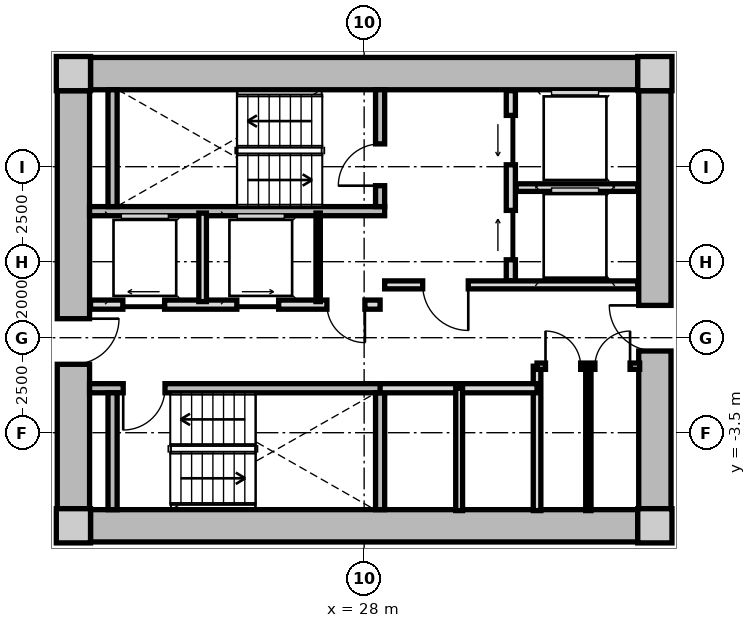
"""IFC4 building model, lengths in metres.
Left out: names, types, materials, properties, quantities, classifications, styles, units other than length and angle.
Written with IfcOpenShell. Run it as: python <this file> out.ifc"""

import sys

from ifc_helpers import new_model, si_unit, direction, frame, frame_2d, origin, origin_2d, place, context, subcontext, project, spatial, rectangle, extrude, source, transform, mapped, element, fill, save


model = new_model("IFC4")
c1 = context("Model", 3, precision=1e-05, world=origin(), true_north=direction((0.0, 1.0)))
c2 = subcontext(c1, "Body", "Model", "MODEL_VIEW")
j1 = project(units=[si_unit("LENGTHUNIT", "METRE"), si_unit("PLANEANGLEUNIT", "RADIAN")], contexts=[c1])
p1 = place(None, origin())
s1 = spatial("IfcSite", under=j1, at=p1, CompositionType="ELEMENT")
p2 = place(p1, origin())
s2 = spatial("IfcBuilding", under=s1, at=p2, CompositionType="ELEMENT")
p3 = place(p2, frame((0.0, 0.0, 30.75)))
s3 = spatial("IfcBuildingStorey", under=s2, at=p3, CompositionType="ELEMENT", Elevation=30.75)
m1 = source(origin(), c2, "Body", "SweptSolid", [
    extrude(rectangle(XDim=0.9, YDim=0.9, at=origin_2d()), origin(), (0.0, 0.0, 1.0), 3.05),
])
for number, where, z_axis, x_axis in (
    (1, (20.35, -5.95, 0.0), (0.0, 0.0, 1.0), (1.0, 0.0, 0.0)),
    (2, (35.65, -5.95, 0.0), (0.0, 0.0, 1.0), (1.0, 0.0, 0.0)),
    (3, (35.65, 5.95, 0.0), (0.0, 0.0, 1.0), (1.0, 0.0, 0.0)),
    (4, (20.35, 5.95, 0.0), (0.0, 0.0, 1.0), (1.0, 0.0, 0.0)),
):
    element("IfcColumn", number, at=place(p3, frame(where, z_axis=z_axis, x_axis=x_axis)), inside=s3, PredefinedType="COLUMN", context=c2, shape_type="MappedRepresentation", body=[
        mapped(m1, transform((0.0, 0.0, 0.0), x_axis=(1.0, 0.0, 0.0), y_axis=(0.0, 1.0, 0.0), z_axis=(0.0, 0.0, 1.0), scale=1.0)),
    ])
m2 = source(origin(), c2, "Body", "SweptSolid", [
    extrude(rectangle(XDim=14.4, YDim=0.85, at=frame_2d((7.2, 0.0))), origin(), (0.0, 0.0, 1.0), 2.79),
])
for number, where, z_axis, x_axis in (
    (5, (20.8, 5.95, 0.0), (0.0, 0.0, 1.0), (1.0, 0.0, 0.0)),
    (6, (35.2, -5.95, 0.0), (0.0, 0.0, 1.0), (-1.0, 0.0, 0.0)),
):
    element("IfcWall", number, at=place(p3, frame(where, z_axis=z_axis, x_axis=x_axis)), inside=s3, PredefinedType="SHEAR", context=c2, shape_type="MappedRepresentation", body=[
        mapped(m2, transform((0.0, 0.0, 0.0), x_axis=(1.0, 0.0, 0.0), y_axis=(0.0, 1.0, 0.0), z_axis=(0.0, 0.0, 1.0), scale=1.0)),
    ])
m3 = source(origin(), c2, "Body", "SweptSolid", [
    extrude(rectangle(XDim=11.0, YDim=0.85, at=frame_2d((5.5, 0.0))), origin(), (0.0, 0.0, 1.0), 2.79),
])
p4 = place(p3, frame((20.35, -5.5, 0.0), z_axis=(0.0, 0.0, 1.0), x_axis=(0.0, 1.0, 0.0)))
e7 = element("IfcWall", 7, at=p4, inside=s3, PredefinedType="SHEAR", context=c2, shape_type="MappedRepresentation", body=[
    mapped(m3, transform((0.0, 0.0, 0.0), x_axis=(1.0, 0.0, 0.0), y_axis=(0.0, 1.0, 0.0), z_axis=(0.0, 0.0, 1.0), scale=1.0)),
])
p5 = place(p4, frame((3.8, 0.0, 0.0)))
e8 = element("IfcOpeningElement", 8, at=p5, cuts=e7, PredefinedType="OPENING", context=c2, shape_type="SweptSolid", body=[
    extrude(rectangle(XDim=1.2, YDim=2.15, at=frame_2d((0.6, 1.075))), frame((0.0, 0.435, 0.0), z_axis=(0.0, -1.0, 0.0), x_axis=(1.0, 0.0, 0.0)), (0.0, 0.0, 1.0), 0.87),
])
p6 = place(p3, frame((35.65, 5.5, 0.0), z_axis=(0.0, 0.0, 1.0), x_axis=(0.0, -1.0, 0.0)))
e9 = element("IfcWall", 9, at=p6, inside=s3, PredefinedType="SHEAR", context=c2, shape_type="MappedRepresentation", body=[
    mapped(m3, transform((0.0, 0.0, 0.0), x_axis=(1.0, 0.0, 0.0), y_axis=(0.0, 1.0, 0.0), z_axis=(0.0, 0.0, 1.0), scale=1.0)),
])
p7 = place(p6, frame((5.65, 0.0, 0.0)))
e10 = element("IfcOpeningElement", 10, at=p7, cuts=e9, PredefinedType="OPENING", context=c2, shape_type="SweptSolid", body=[
    extrude(rectangle(XDim=1.2, YDim=2.15, at=frame_2d((0.6, 1.075))), frame((0.0, 0.435, 0.0), z_axis=(0.0, -1.0, 0.0), x_axis=(1.0, 0.0, 0.0)), (0.0, 0.0, 1.0), 0.87),
])
m4 = source(origin(), c2, "Body", "SweptSolid", [
    extrude(rectangle(XDim=7.765, YDim=0.24, at=frame_2d((3.883, 0.0))), origin(), (0.0, 0.0, 1.0), 2.79),
])
p8 = place(p3, frame((20.775, 2.33, 0.0), z_axis=(0.0, 0.0, 1.0), x_axis=(1.0, 0.0, 0.0)))
e11 = element("IfcWall", 11, at=p8, inside=s3, PredefinedType="PARTITIONING", context=c2, shape_type="MappedRepresentation", body=[
    mapped(m4, transform((0.0, 0.0, 0.0), x_axis=(1.0, 0.0, 0.0), y_axis=(0.0, 1.0, 0.0), z_axis=(0.0, 0.0, 1.0), scale=1.0)),
])
m5 = source(origin(), c2, "Body", "SweptSolid", [
    extrude(rectangle(XDim=3.075, YDim=0.24, at=frame_2d((1.538, 0.0))), origin(), (0.0, 0.0, 1.0), 2.79),
])
p9 = place(p3, frame((21.38, 2.45, 0.0), z_axis=(0.0, 0.0, 1.0), x_axis=(0.0, 1.0, 0.0)))
e12 = element("IfcWall", 12, at=p9, inside=s3, PredefinedType="PARTITIONING", context=c2, shape_type="MappedRepresentation", body=[
    mapped(m5, transform((0.0, 0.0, 0.0), x_axis=(1.0, 0.0, 0.0), y_axis=(0.0, 1.0, 0.0), z_axis=(0.0, 0.0, 1.0), scale=1.0)),
])
p10 = place(p3, frame((28.42, 2.45, 0.0), z_axis=(0.0, 0.0, 1.0), x_axis=(0.0, 1.0, 0.0)))
e13 = element("IfcWall", 13, at=p10, inside=s3, PredefinedType="PARTITIONING", context=c2, shape_type="MappedRepresentation", body=[
    mapped(m5, transform((0.0, 0.0, 0.0), x_axis=(1.0, 0.0, 0.0), y_axis=(0.0, 1.0, 0.0), z_axis=(0.0, 0.0, 1.0), scale=1.0)),
])
p11 = place(p10, frame((0.55, 0.0, 0.0)))
e14 = element("IfcOpeningElement", 14, at=p11, cuts=e13, PredefinedType="OPENING", context=c2, shape_type="SweptSolid", body=[
    extrude(rectangle(XDim=1.1, YDim=2.15, at=frame_2d((0.55, 1.075))), frame((0.0, 0.13, 0.0), z_axis=(0.0, -1.0, 0.0), x_axis=(1.0, 0.0, 0.0)), (0.0, 0.0, 1.0), 0.26),
])
p12 = place(p3, frame((20.775, -2.33, 0.0), z_axis=(0.0, 0.0, 1.0), x_axis=(1.0, 0.0, 0.0)))
e15 = element("IfcWall", 15, at=p12, inside=s3, PredefinedType="PARTITIONING", context=c2, shape_type="MappedRepresentation", body=[
    mapped(m4, transform((0.0, 0.0, 0.0), x_axis=(1.0, 0.0, 0.0), y_axis=(0.0, 1.0, 0.0), z_axis=(0.0, 0.0, 1.0), scale=1.0)),
])
p13 = place(p12, frame((0.885, 0.0, 0.0)))
e16 = element("IfcOpeningElement", 16, at=p13, cuts=e15, PredefinedType="OPENING", context=c2, shape_type="SweptSolid", body=[
    extrude(rectangle(XDim=1.1, YDim=2.15, at=frame_2d((0.55, 1.075))), frame((0.0, 0.13, 0.0), z_axis=(0.0, -1.0, 0.0), x_axis=(1.0, 0.0, 0.0)), (0.0, 0.0, 1.0), 0.26),
])
for number, where, z_axis, x_axis in (
    (17, (21.38, -5.525, 0.0), (0.0, 0.0, 1.0), (0.0, 1.0, 0.0)),
    (18, (28.42, -5.525, 0.0), (0.0, 0.0, 1.0), (0.0, 1.0, 0.0)),
):
    element("IfcWall", number, at=place(p3, frame(where, z_axis=z_axis, x_axis=x_axis)), inside=s3, PredefinedType="PARTITIONING", context=c2, shape_type="MappedRepresentation", body=[
        mapped(m5, transform((0.0, 0.0, 0.0), x_axis=(1.0, 0.0, 0.0), y_axis=(0.0, 1.0, 0.0), z_axis=(0.0, 0.0, 1.0), scale=1.0)),
    ])
m6 = source(origin(), c2, "Body", "SweptSolid", [
    extrude(rectangle(XDim=5.0, YDim=0.24, at=frame_2d((2.5, 0.0))), origin(), (0.0, 0.0, 1.0), 2.775),
])
p14 = place(p3, frame((31.86, 0.5, 0.0), z_axis=(0.0, 0.0, 1.0), x_axis=(0.0, 1.0, 0.0)))
e19 = element("IfcWall", 19, at=p14, inside=s3, PredefinedType="PARTITIONING", context=c2, shape_type="MappedRepresentation", body=[
    mapped(m6, transform((0.0, 0.0, 0.0), x_axis=(1.0, 0.0, 0.0), y_axis=(0.0, 1.0, 0.0), z_axis=(0.0, 0.0, 1.0), scale=1.0)),
])
p15 = place(p14, frame((3.05, 0.0, 0.0)))
e20 = element("IfcOpeningElement", 20, at=p15, cuts=e19, PredefinedType="OPENING", context=c2, shape_type="SweptSolid", body=[
    extrude(rectangle(XDim=1.3, YDim=2.2, at=frame_2d((0.65, 1.1))), frame((0.0, 0.13, 0.0), z_axis=(0.0, -1.0, 0.0), x_axis=(1.0, 0.0, 0.0)), (0.0, 0.0, 1.0), 0.26),
])
p16 = place(p14, frame((0.55, 0.0, 0.0)))
e21 = element("IfcOpeningElement", 21, at=p16, cuts=e19, PredefinedType="OPENING", context=c2, shape_type="SweptSolid", body=[
    extrude(rectangle(XDim=1.3, YDim=2.2, at=frame_2d((0.65, 1.1))), frame((0.0, 0.13, 0.0), z_axis=(0.0, -1.0, 0.0), x_axis=(1.0, 0.0, 0.0)), (0.0, 0.0, 1.0), 0.26),
])
m7 = source(origin(), c2, "Body", "SweptSolid", [
    extrude(rectangle(XDim=3.2, YDim=0.2, at=frame_2d((1.6, 0.0))), origin(), (0.0, 0.0, 1.0), 2.775),
])
p17 = place(p3, frame((32.0, 2.95, 0.0), z_axis=(0.0, 0.0, 1.0), x_axis=(1.0, 0.0, 0.0)))
e22 = element("IfcWall", 22, at=p17, inside=s3, PredefinedType="PARTITIONING", context=c2, shape_type="MappedRepresentation", body=[
    mapped(m7, transform((0.0, 0.0, 0.0), x_axis=(1.0, 0.0, 0.0), y_axis=(0.0, 1.0, 0.0), z_axis=(0.0, 0.0, 1.0), scale=1.0)),
])
m8 = source(origin(), c2, "Body", "SweptSolid", [
    extrude(rectangle(XDim=6.66, YDim=0.21, at=frame_2d((3.33, 0.0))), origin(), (0.0, 0.0, 1.0), 2.775),
])
p18 = place(p3, frame((28.54, 0.39, 0.0), z_axis=(0.0, 0.0, 1.0), x_axis=(1.0, 0.0, 0.0)))
e23 = element("IfcWall", 23, at=p18, inside=s3, PredefinedType="PARTITIONING", context=c2, shape_type="MappedRepresentation", body=[
    mapped(m8, transform((0.0, 0.0, 0.0), x_axis=(1.0, 0.0, 0.0), y_axis=(0.0, 1.0, 0.0), z_axis=(0.0, 0.0, 1.0), scale=1.0)),
])
p19 = place(p18, frame((1.0, 0.0, 0.0)))
e24 = element("IfcOpeningElement", 24, at=p19, cuts=e23, PredefinedType="OPENING", context=c2, shape_type="SweptSolid", body=[
    extrude(rectangle(XDim=1.2, YDim=2.15, at=frame_2d((0.6, 1.075))), frame((0.0, 0.115, 0.0), z_axis=(0.0, -1.0, 0.0), x_axis=(1.0, 0.0, 0.0)), (0.0, 0.0, 1.0), 0.23),
])
m9 = source(origin(), c2, "Body", "SweptSolid", [
    extrude(rectangle(XDim=7.62, YDim=0.24, at=frame_2d((3.81, 0.0))), origin(), (0.0, 0.0, 1.0), 2.775),
])
p20 = place(p3, frame((20.8, -0.13, 0.0), z_axis=(0.0, 0.0, 1.0), x_axis=(1.0, 0.0, 0.0)))
e25 = element("IfcWall", 25, at=p20, inside=s3, PredefinedType="PARTITIONING", context=c2, shape_type="MappedRepresentation", body=[
    mapped(m9, transform((0.0, 0.0, 0.0), x_axis=(1.0, 0.0, 0.0), y_axis=(0.0, 1.0, 0.0), z_axis=(0.0, 0.0, 1.0), scale=1.0)),
])
p21 = place(p20, frame((6.22, 0.0, 0.0)))
e26 = element("IfcOpeningElement", 26, at=p21, cuts=e25, PredefinedType="OPENING", context=c2, shape_type="SweptSolid", body=[
    extrude(rectangle(XDim=1.0, YDim=2.1, at=frame_2d((0.5, 1.05))), frame((0.0, 0.13, 0.0), z_axis=(0.0, -1.0, 0.0), x_axis=(1.0, 0.0, 0.0)), (0.0, 0.0, 1.0), 0.26),
])
p22 = place(p20, frame((0.85, 0.0, 0.0)))
e27 = element("IfcOpeningElement", 27, at=p22, cuts=e25, PredefinedType="OPENING", context=c2, shape_type="SweptSolid", body=[
    extrude(rectangle(XDim=1.1, YDim=2.2, at=frame_2d((0.55, 1.1))), frame((0.0, 0.13, 0.0), z_axis=(0.0, -1.0, 0.0), x_axis=(1.0, 0.0, 0.0)), (0.0, 0.0, 1.0), 0.26),
])
p23 = place(p20, frame((3.85, 0.0, 0.0)))
e28 = element("IfcOpeningElement", 28, at=p23, cuts=e25, PredefinedType="OPENING", context=c2, shape_type="SweptSolid", body=[
    extrude(rectangle(XDim=1.1, YDim=2.2, at=frame_2d((0.55, 1.1))), frame((0.0, 0.13, 0.0), z_axis=(0.0, -1.0, 0.0), x_axis=(1.0, 0.0, 0.0)), (0.0, 0.0, 1.0), 0.26),
])
m10 = source(origin(), c2, "Body", "SweptSolid", [
    extrude(rectangle(XDim=2.33, YDim=0.115, at=frame_2d((1.165, 0.0))), origin(), (0.0, 0.0, 1.0), 2.775),
])
p24 = place(p3, frame((26.79, -0.05, 0.0), z_axis=(0.0, 0.0, 1.0), x_axis=(0.0, 1.0, 0.0)))
e29 = element("IfcWall", 29, at=p24, inside=s3, PredefinedType="PARTITIONING", context=c2, shape_type="MappedRepresentation", body=[
    mapped(m10, transform((0.0, 0.0, 0.0), x_axis=(1.0, 0.0, 0.0), y_axis=(0.0, 1.0, 0.0), z_axis=(0.0, 0.0, 1.0), scale=1.0)),
])
m11 = source(origin(), c2, "Body", "SweptSolid", [
    extrude(rectangle(XDim=2.33, YDim=0.2, at=frame_2d((1.165, 0.0))), origin(), (0.0, 0.0, 1.0), 2.775),
])
p25 = place(p3, frame((23.75, -0.05, 0.0), z_axis=(0.0, 0.0, 1.0), x_axis=(0.0, 1.0, 0.0)))
e30 = element("IfcWall", 30, at=p25, inside=s3, PredefinedType="PARTITIONING", context=c2, shape_type="MappedRepresentation", body=[
    mapped(m11, transform((0.0, 0.0, 0.0), x_axis=(1.0, 0.0, 0.0), y_axis=(0.0, 1.0, 0.0), z_axis=(0.0, 0.0, 1.0), scale=1.0)),
])
m12 = source(origin(), c2, "Body", "SweptSolid", [
    extrude(rectangle(XDim=3.8, YDim=0.2, at=frame_2d((1.9, 0.0))), origin(), (0.0, 0.0, 1.0), 2.775),
])
p26 = place(p3, frame((32.55, -5.55, 0.0), z_axis=(0.0, 0.0, 1.0), x_axis=(0.0, 1.0, 0.0)))
e31 = element("IfcWall", 31, at=p26, inside=s3, PredefinedType="PARTITIONING", context=c2, shape_type="MappedRepresentation", body=[
    mapped(m12, transform((0.0, 0.0, 0.0), x_axis=(1.0, 0.0, 0.0), y_axis=(0.0, 1.0, 0.0), z_axis=(0.0, 0.0, 1.0), scale=1.0)),
])
m13 = source(origin(), c2, "Body", "SweptSolid", [
    extrude(rectangle(XDim=4.13, YDim=0.24, at=frame_2d((2.065, 0.0))), origin(), (0.0, 0.0, 1.0), 2.775),
])
p27 = place(p3, frame((28.42, -2.33, 0.0), z_axis=(0.0, 0.0, 1.0), x_axis=(1.0, 0.0, 0.0)))
e32 = element("IfcWall", 32, at=p27, inside=s3, PredefinedType="PARTITIONING", context=c2, shape_type="MappedRepresentation", body=[
    mapped(m13, transform((0.0, 0.0, 0.0), x_axis=(1.0, 0.0, 0.0), y_axis=(0.0, 1.0, 0.0), z_axis=(0.0, 0.0, 1.0), scale=1.0)),
])
m14 = source(origin(), c2, "Body", "SweptSolid", [
    extrude(rectangle(XDim=3.22, YDim=0.18, at=frame_2d((1.61, 0.0))), origin(), (0.0, 0.0, 1.0), 2.775),
])
p28 = place(p3, frame((30.5, -5.55, 0.0), z_axis=(0.0, 0.0, 1.0), x_axis=(0.0, 1.0, 0.0)))
e33 = element("IfcWall", 33, at=p28, inside=s3, PredefinedType="PARTITIONING", context=c2, shape_type="MappedRepresentation", body=[
    mapped(m14, transform((0.0, 0.0, 0.0), x_axis=(1.0, 0.0, 0.0), y_axis=(0.0, 1.0, 0.0), z_axis=(0.0, 0.0, 1.0), scale=1.0)),
])
m15 = source(origin(), c2, "Body", "SweptSolid", [
    extrude(rectangle(XDim=2.7, YDim=0.165, at=frame_2d((1.35, 0.0))), origin(), (0.0, 0.0, 1.0), 2.775),
])
p29 = place(p3, frame((32.55, -1.75, 0.0), z_axis=(0.0, 0.0, 1.0), x_axis=(1.0, 0.0, 0.0)))
e34 = element("IfcWall", 34, at=p29, inside=s3, PredefinedType="PARTITIONING", context=c2, shape_type="MappedRepresentation", body=[
    mapped(m15, transform((0.0, 0.0, 0.0), x_axis=(1.0, 0.0, 0.0), y_axis=(0.0, 1.0, 0.0), z_axis=(0.0, 0.0, 1.0), scale=1.0)),
])
p30 = place(p29, frame((0.222, 0.0, 0.0)))
e35 = element("IfcOpeningElement", 35, at=p30, cuts=e34, PredefinedType="OPENING", context=c2, shape_type="SweptSolid", body=[
    extrude(rectangle(XDim=0.925, YDim=2.1, at=frame_2d((0.462, 1.05))), frame((0.0, 0.093, 0.0), z_axis=(0.0, -1.0, 0.0), x_axis=(1.0, 0.0, 0.0)), (0.0, 0.0, 1.0), 0.185),
])
p31 = place(p29, frame((1.522, 0.0, 0.0)))
e36 = element("IfcOpeningElement", 36, at=p31, cuts=e34, PredefinedType="OPENING", context=c2, shape_type="SweptSolid", body=[
    extrude(rectangle(XDim=0.925, YDim=2.1, at=frame_2d((0.462, 1.05))), frame((0.0, 0.093, 0.0), z_axis=(0.0, -1.0, 0.0), x_axis=(1.0, 0.0, 0.0)), (0.0, 0.0, 1.0), 0.185),
])
m16 = source(origin(), c2, "Body", "SweptSolid", [
    extrude(rectangle(XDim=3.8, YDim=0.14, at=frame_2d((1.9, 0.0))), origin(), (0.0, 0.0, 1.0), 2.775),
])
p32 = place(p3, frame((33.9, -5.55, 0.0), z_axis=(0.0, 0.0, 1.0), x_axis=(0.0, 1.0, 0.0)))
e37 = element("IfcWall", 37, at=p32, inside=s3, PredefinedType="PARTITIONING", context=c2, shape_type="MappedRepresentation", body=[
    mapped(m16, transform((0.0, 0.0, 0.0), x_axis=(1.0, 0.0, 0.0), y_axis=(0.0, 1.0, 0.0), z_axis=(0.0, 0.0, 1.0), scale=1.0)),
])
m17 = source(origin(), c2, "Body", "SweptSolid", [
    extrude(rectangle(XDim=1.1, YDim=2.15, at=frame_2d((0.55, 1.075))), frame((0.0, 0.025, 0.0), z_axis=(0.0, -1.0, 0.0), x_axis=(1.0, 0.0, 0.0)), (0.0, 0.0, 1.0), 0.05),
])
p33 = place(p11, origin())
e38 = element("IfcDoor", 38, at=p33, inside=s3, OperationType="SINGLE_SWING_LEFT", PredefinedType="DOOR", context=c2, shape_type="MappedRepresentation", body=[
    mapped(m17, transform((0.0, 0.0, 0.0), x_axis=(1.0, 0.0, 0.0), y_axis=(0.0, 1.0, 0.0), z_axis=(0.0, 0.0, 1.0), scale=1.0)),
])
fill(e14, e38)
p34 = place(p13, frame((1.1, 0.0, 0.0), z_axis=(0.0, 0.0, 1.0), x_axis=(-1.0, 0.0, 0.0)))
e39 = element("IfcDoor", 39, at=p34, inside=s3, OperationType="SINGLE_SWING_RIGHT", PredefinedType="DOOR", context=c2, shape_type="MappedRepresentation", body=[
    mapped(m17, transform((0.0, 0.0, 0.0), x_axis=(1.0, 0.0, 0.0), y_axis=(0.0, 1.0, 0.0), z_axis=(0.0, 0.0, 1.0), scale=1.0)),
])
fill(e16, e39)
m18 = source(origin(), c2, "Body", "SweptSolid", [
    extrude(rectangle(XDim=1.3, YDim=2.2, at=frame_2d((0.65, 1.1))), frame((0.0, 0.025, 0.0), z_axis=(0.0, -1.0, 0.0), x_axis=(1.0, 0.0, 0.0)), (0.0, 0.0, 1.0), 0.05),
])
p35 = place(p15, origin())
e40 = element("IfcDoor", 40, at=p35, inside=s3, OperationType="SLIDING_TO_LEFT", PredefinedType="DOOR", context=c2, shape_type="MappedRepresentation", body=[
    mapped(m18, transform((0.0, 0.0, 0.0), x_axis=(1.0, 0.0, 0.0), y_axis=(0.0, 1.0, 0.0), z_axis=(0.0, 0.0, 1.0), scale=1.0)),
])
fill(e20, e40)
p36 = place(p16, origin())
e41 = element("IfcDoor", 41, at=p36, inside=s3, OperationType="SLIDING_TO_RIGHT", PredefinedType="DOOR", context=c2, shape_type="MappedRepresentation", body=[
    mapped(m18, transform((0.0, 0.0, 0.0), x_axis=(1.0, 0.0, 0.0), y_axis=(0.0, 1.0, 0.0), z_axis=(0.0, 0.0, 1.0), scale=1.0)),
])
fill(e21, e41)
m19 = source(origin(), c2, "Body", "SweptSolid", [
    extrude(rectangle(XDim=1.2, YDim=2.15, at=frame_2d((0.6, 1.075))), frame((0.0, 0.025, 0.0), z_axis=(0.0, -1.0, 0.0), x_axis=(1.0, 0.0, 0.0)), (0.0, 0.0, 1.0), 0.05),
])
p37 = place(p19, frame((1.2, 0.0, 0.0), z_axis=(0.0, 0.0, 1.0), x_axis=(-1.0, 0.0, 0.0)))
e42 = element("IfcDoor", 42, at=p37, inside=s3, OperationType="SINGLE_SWING_LEFT", PredefinedType="DOOR", context=c2, shape_type="MappedRepresentation", body=[
    mapped(m19, transform((0.0, 0.0, 0.0), x_axis=(1.0, 0.0, 0.0), y_axis=(0.0, 1.0, 0.0), z_axis=(0.0, 0.0, 1.0), scale=1.0)),
])
fill(e24, e42)
p38 = place(p5, frame((1.2, 0.0, 0.0), z_axis=(0.0, 0.0, 1.0), x_axis=(-1.0, 0.0, 0.0)))
e43 = element("IfcDoor", 43, at=p38, inside=s3, OperationType="SINGLE_SWING_LEFT", PredefinedType="DOOR", context=c2, shape_type="MappedRepresentation", body=[
    mapped(m19, transform((0.0, 0.0, 0.0), x_axis=(1.0, 0.0, 0.0), y_axis=(0.0, 1.0, 0.0), z_axis=(0.0, 0.0, 1.0), scale=1.0)),
])
fill(e8, e43)
p39 = place(p7, frame((1.2, 0.0, 0.0), z_axis=(0.0, 0.0, 1.0), x_axis=(-1.0, 0.0, 0.0)))
e44 = element("IfcDoor", 44, at=p39, inside=s3, OperationType="SINGLE_SWING_RIGHT", PredefinedType="DOOR", context=c2, shape_type="MappedRepresentation", body=[
    mapped(m19, transform((0.0, 0.0, 0.0), x_axis=(1.0, 0.0, 0.0), y_axis=(0.0, 1.0, 0.0), z_axis=(0.0, 0.0, 1.0), scale=1.0)),
])
fill(e10, e44)
m20 = source(origin(), c2, "Body", "SweptSolid", [
    extrude(rectangle(XDim=1.0, YDim=2.1, at=frame_2d((0.5, 1.05))), frame((0.0, 0.025, 0.0), z_axis=(0.0, -1.0, 0.0), x_axis=(1.0, 0.0, 0.0)), (0.0, 0.0, 1.0), 0.05),
])
p40 = place(p21, frame((1.0, 0.0, 0.0), z_axis=(0.0, 0.0, 1.0), x_axis=(-1.0, 0.0, 0.0)))
e45 = element("IfcDoor", 45, at=p40, inside=s3, OperationType="SINGLE_SWING_LEFT", PredefinedType="DOOR", context=c2, shape_type="MappedRepresentation", body=[
    mapped(m20, transform((0.0, 0.0, 0.0), x_axis=(1.0, 0.0, 0.0), y_axis=(0.0, 1.0, 0.0), z_axis=(0.0, 0.0, 1.0), scale=1.0)),
])
fill(e26, e45)
m21 = source(origin(), c2, "Body", "SweptSolid", [
    extrude(rectangle(XDim=1.1, YDim=2.2, at=frame_2d((0.55, 1.1))), frame((0.0, 0.025, 0.0), z_axis=(0.0, -1.0, 0.0), x_axis=(1.0, 0.0, 0.0)), (0.0, 0.0, 1.0), 0.05),
])
p41 = place(p22, origin())
e46 = element("IfcDoor", 46, at=p41, inside=s3, OperationType="SLIDING_TO_LEFT", PredefinedType="DOOR", context=c2, shape_type="MappedRepresentation", body=[
    mapped(m21, transform((0.0, 0.0, 0.0), x_axis=(1.0, 0.0, 0.0), y_axis=(0.0, 1.0, 0.0), z_axis=(0.0, 0.0, 1.0), scale=1.0)),
])
fill(e27, e46)
p42 = place(p23, origin())
e47 = element("IfcDoor", 47, at=p42, inside=s3, OperationType="SLIDING_TO_RIGHT", PredefinedType="DOOR", context=c2, shape_type="MappedRepresentation", body=[
    mapped(m21, transform((0.0, 0.0, 0.0), x_axis=(1.0, 0.0, 0.0), y_axis=(0.0, 1.0, 0.0), z_axis=(0.0, 0.0, 1.0), scale=1.0)),
])
fill(e28, e47)
m22 = source(origin(), c2, "Body", "SweptSolid", [
    extrude(rectangle(XDim=0.925, YDim=2.1, at=frame_2d((0.462, 1.05))), frame((0.0, 0.025, 0.0), z_axis=(0.0, -1.0, 0.0), x_axis=(1.0, 0.0, 0.0)), (0.0, 0.0, 1.0), 0.05),
])
p43 = place(p30, origin())
e48 = element("IfcDoor", 48, at=p43, inside=s3, OperationType="SINGLE_SWING_LEFT", PredefinedType="DOOR", context=c2, shape_type="MappedRepresentation", body=[
    mapped(m22, transform((0.0, 0.0, 0.0), x_axis=(1.0, 0.0, 0.0), y_axis=(0.0, 1.0, 0.0), z_axis=(0.0, 0.0, 1.0), scale=1.0)),
])
fill(e35, e48)
p44 = place(p31, origin())
e49 = element("IfcDoor", 49, at=p44, inside=s3, OperationType="SINGLE_SWING_RIGHT", PredefinedType="DOOR", context=c2, shape_type="MappedRepresentation", body=[
    mapped(m22, transform((0.0, 0.0, 0.0), x_axis=(1.0, 0.0, 0.0), y_axis=(0.0, 1.0, 0.0), z_axis=(0.0, 0.0, 1.0), scale=1.0)),
])
fill(e36, e49)
save(model, sys.argv[1])
